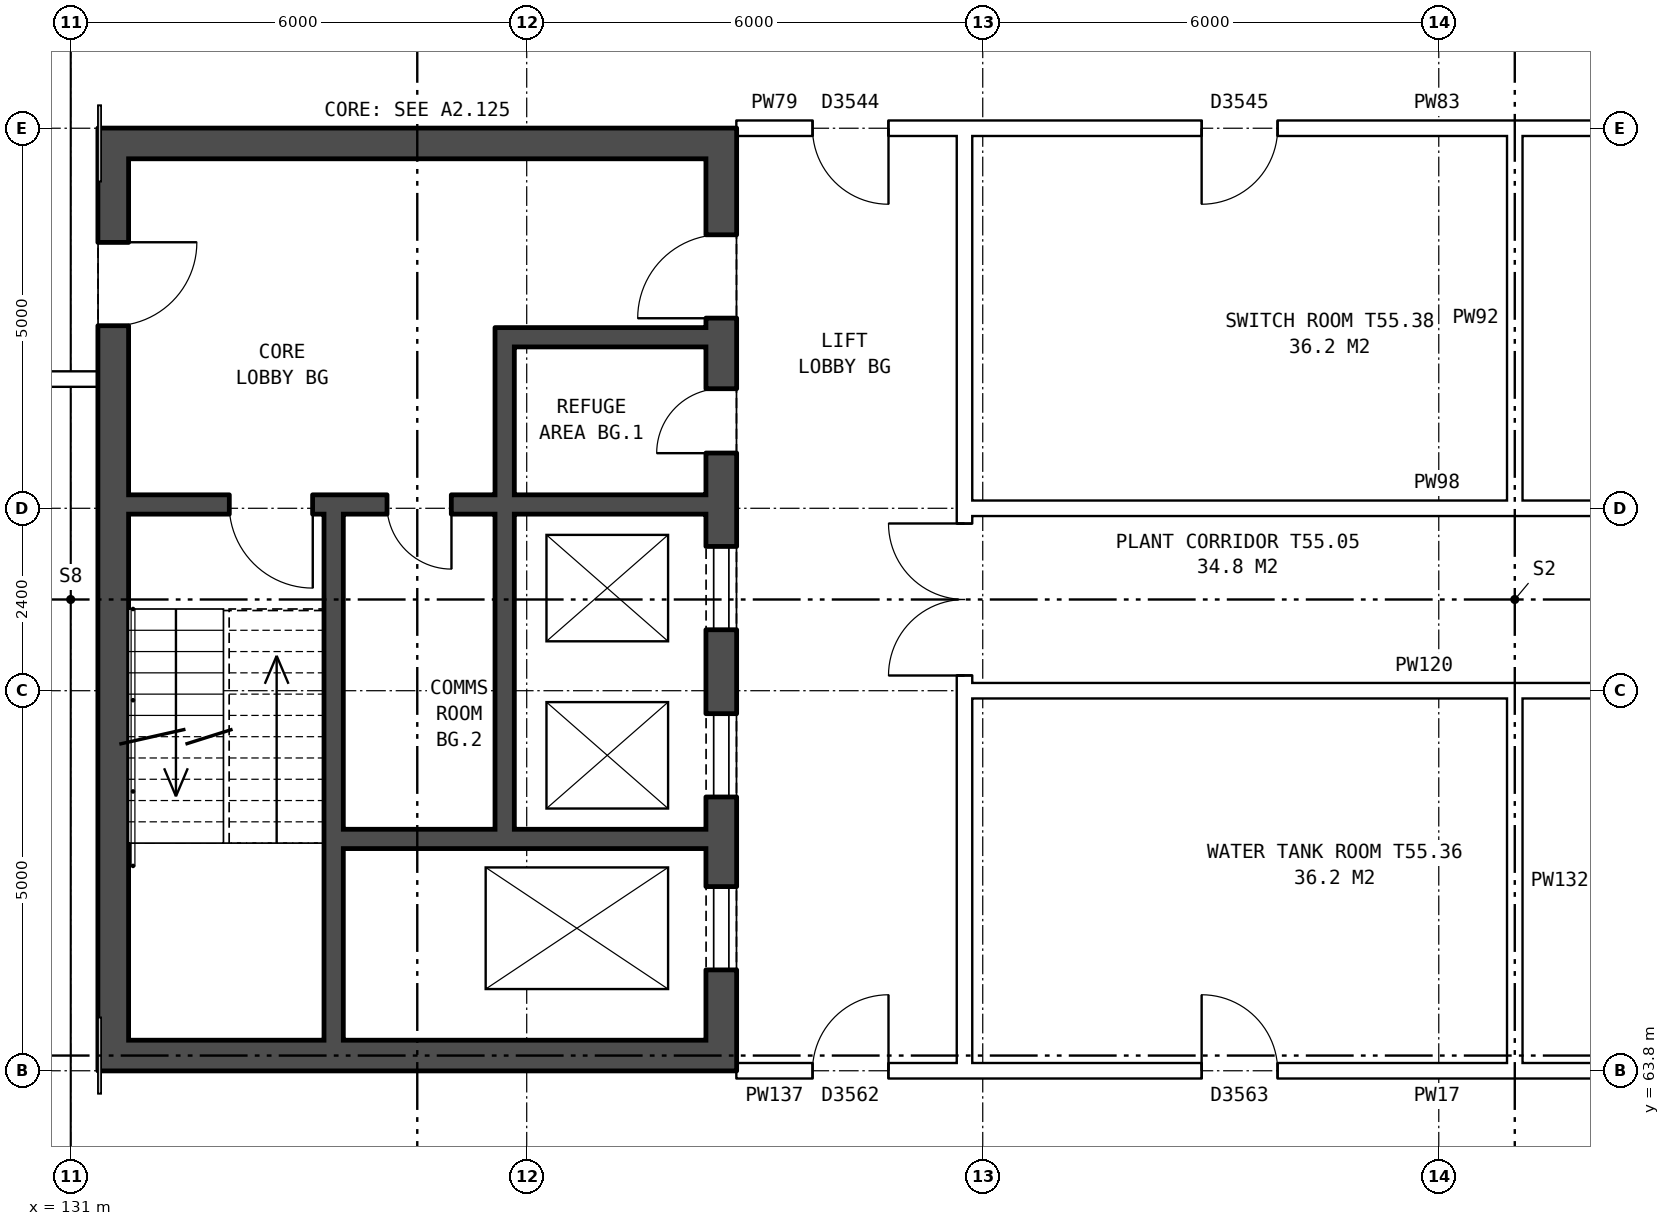
"""IFC4 building model, lengths in metres.
Left out: names, types, materials, properties, quantities, classifications, styles, units other than length and angle.
Written with IfcOpenShell. Run it as: python <this file> out.ifc"""

import sys

from ifc_helpers import new_model, si_unit, direction, frame, frame_2d, origin, place, context, subcontext, project, spatial, rectangle, extrude, element, fill, save


model = new_model("IFC4")
c1 = context("Model", 3, precision=1e-05, world=origin(), true_north=direction((0.0, 1.0)))
c2 = subcontext(c1, "Body", "Model", "MODEL_VIEW")
j1 = project(units=[si_unit("LENGTHUNIT", "METRE"), si_unit("PLANEANGLEUNIT", "RADIAN")], contexts=[c1])
p1 = place(None, origin())
s1 = spatial("IfcSite", under=j1, at=p1, CompositionType="ELEMENT")
p2 = place(p1, origin())
s2 = spatial("IfcBuilding", under=s1, at=p2, CompositionType="ELEMENT")
p3 = place(p2, frame((0.0, 0.0, 194.4)))
s3 = spatial("IfcBuildingStorey", under=s2, at=p3, CompositionType="ELEMENT", Elevation=194.4)
p4 = place(p3, frame((139.56, 63.8, 0.0), z_axis=(0.0, 0.0, 1.0), x_axis=(0.0, 1.0, 0.0)))
e1 = element("IfcWall", 1, at=p4, inside=s3, PredefinedType="SHEAR", context=c2, shape_type="SweptSolid", body=[
    extrude(rectangle(XDim=12.4, YDim=0.4, at=frame_2d((6.2, 0.0))), origin(), (0.0, 0.0, 1.0), 3.95),
])
p5 = place(p4, frame((1.325, 0.0, 0.0)))
e2 = element("IfcOpeningElement", 2, at=p5, cuts=e1, PredefinedType="OPENING", context=c2, shape_type="SweptSolid", body=[
    extrude(rectangle(XDim=1.1, YDim=2.1, at=frame_2d((0.55, 1.05))), frame((0.0, 0.21, 0.0), z_axis=(0.0, -1.0, 0.0), x_axis=(1.0, 0.0, 0.0)), (0.0, 0.0, 1.0), 0.42),
])
p6 = place(p4, frame((3.6, 0.0, 0.0)))
e3 = element("IfcOpeningElement", 3, at=p6, cuts=e1, PredefinedType="OPENING", context=c2, shape_type="SweptSolid", body=[
    extrude(rectangle(XDim=1.1, YDim=2.1, at=frame_2d((0.55, 1.05))), frame((0.0, 0.21, 0.0), z_axis=(0.0, -1.0, 0.0), x_axis=(1.0, 0.0, 0.0)), (0.0, 0.0, 1.0), 0.42),
])
p7 = place(p4, frame((5.8, 0.0, 0.0)))
e4 = element("IfcOpeningElement", 4, at=p7, cuts=e1, PredefinedType="OPENING", context=c2, shape_type="SweptSolid", body=[
    extrude(rectangle(XDim=1.1, YDim=2.1, at=frame_2d((0.55, 1.05))), frame((0.0, 0.21, 0.0), z_axis=(0.0, -1.0, 0.0), x_axis=(1.0, 0.0, 0.0)), (0.0, 0.0, 1.0), 0.42),
])
p8 = place(p4, frame((9.9, 0.0, 0.0)))
e5 = element("IfcOpeningElement", 5, at=p8, cuts=e1, PredefinedType="OPENING", context=c2, shape_type="SweptSolid", body=[
    extrude(rectangle(XDim=1.1, YDim=2.1, at=frame_2d((0.55, 1.05))), frame((0.0, 0.21, 0.0), z_axis=(0.0, -1.0, 0.0), x_axis=(1.0, 0.0, 0.0)), (0.0, 0.0, 1.0), 0.42),
])
p9 = place(p4, frame((8.125, 0.0, 0.0)))
e6 = element("IfcOpeningElement", 6, at=p9, cuts=e1, PredefinedType="OPENING", context=c2, shape_type="SweptSolid", body=[
    extrude(rectangle(XDim=0.85, YDim=2.1, at=frame_2d((0.425, 1.05))), frame((0.0, 0.21, 0.0), z_axis=(0.0, -1.0, 0.0), x_axis=(1.0, 0.0, 0.0)), (0.0, 0.0, 1.0), 0.42),
])
p10 = place(p3, frame((131.56, 63.8, 0.0), z_axis=(0.0, 0.0, 1.0), x_axis=(0.0, 1.0, 0.0)))
e7 = element("IfcWall", 7, at=p10, inside=s3, PredefinedType="SHEAR", context=c2, shape_type="SweptSolid", body=[
    extrude(rectangle(XDim=12.4, YDim=0.4, at=frame_2d((6.2, 0.0))), origin(), (0.0, 0.0, 1.0), 3.95),
])
p11 = place(p10, frame((9.8, 0.0, 0.0)))
e8 = element("IfcOpeningElement", 8, at=p11, cuts=e7, PredefinedType="OPENING", context=c2, shape_type="SweptSolid", body=[
    extrude(rectangle(XDim=1.1, YDim=2.1, at=frame_2d((0.55, 1.05))), frame((0.0, 0.21, 0.0), z_axis=(0.0, -1.0, 0.0), x_axis=(1.0, 0.0, 0.0)), (0.0, 0.0, 1.0), 0.42),
])
for number, where, z_axis, x_axis in (
    (9, (139.36, 64.0, 0.0), (0.0, 0.0, 1.0), (-1.0, 0.0, 0.0)),
    (10, (139.36, 76.0, 0.0), (0.0, 0.0, 1.0), (-1.0, 0.0, 0.0)),
):
    element("IfcWall", number, at=place(p3, frame(where, z_axis=z_axis, x_axis=x_axis)), inside=s3, PredefinedType="SHEAR", context=c2, shape_type="SweptSolid", body=[
        extrude(rectangle(XDim=7.6, YDim=0.4, at=frame_2d((3.8, 0.0))), origin(), (0.0, 0.0, 1.0), 3.95),
    ])
p12 = place(p3, frame((139.36, 66.85, 0.0), z_axis=(0.0, 0.0, 1.0), x_axis=(-1.0, 0.0, 0.0)))
e11 = element("IfcWall", 11, at=p12, inside=s3, PredefinedType="SHEAR", context=c2, shape_type="SweptSolid", body=[
    extrude(rectangle(XDim=4.775, YDim=0.25, at=frame_2d((2.388, 0.0))), origin(), (0.0, 0.0, 1.0), 3.95),
])
p13 = place(p3, frame((139.36, 71.25, 0.0), z_axis=(0.0, 0.0, 1.0), x_axis=(-1.0, 0.0, 0.0)))
e12 = element("IfcWall", 12, at=p13, inside=s3, PredefinedType="SHEAR", context=c2, shape_type="SweptSolid", body=[
    extrude(rectangle(XDim=7.6, YDim=0.25, at=frame_2d((3.8, 0.0))), origin(), (0.0, 0.0, 1.0), 3.95),
])
p14 = place(p13, frame((5.175, 0.0, 0.0)))
e13 = element("IfcOpeningElement", 13, at=p14, cuts=e12, PredefinedType="OPENING", context=c2, shape_type="SweptSolid", body=[
    extrude(rectangle(XDim=1.1, YDim=2.1, at=frame_2d((0.55, 1.05))), frame((0.0, 0.135, 0.0), z_axis=(0.0, -1.0, 0.0), x_axis=(1.0, 0.0, 0.0)), (0.0, 0.0, 1.0), 0.27),
])
p15 = place(p13, frame((3.35, 0.0, 0.0)))
e14 = element("IfcOpeningElement", 14, at=p15, cuts=e12, PredefinedType="OPENING", context=c2, shape_type="SweptSolid", body=[
    extrude(rectangle(XDim=0.85, YDim=2.1, at=frame_2d((0.425, 1.05))), frame((0.0, 0.135, 0.0), z_axis=(0.0, -1.0, 0.0), x_axis=(1.0, 0.0, 0.0)), (0.0, 0.0, 1.0), 0.27),
])
p16 = place(p3, frame((139.36, 73.45, 0.0), z_axis=(0.0, 0.0, 1.0), x_axis=(-1.0, 0.0, 0.0)))
e15 = element("IfcWall", 15, at=p16, inside=s3, PredefinedType="SHEAR", context=c2, shape_type="SweptSolid", body=[
    extrude(rectangle(XDim=2.525, YDim=0.25, at=frame_2d((1.263, 0.0))), origin(), (0.0, 0.0, 1.0), 3.95),
])
p17 = place(p3, frame((136.71, 66.975, 0.0), z_axis=(0.0, 0.0, 1.0), x_axis=(0.0, 1.0, 0.0)))
e16 = element("IfcWall", 16, at=p17, inside=s3, PredefinedType="SHEAR", context=c2, shape_type="SweptSolid", body=[
    extrude(rectangle(XDim=4.15, YDim=0.25, at=frame_2d((2.075, 0.0))), origin(), (0.0, 0.0, 1.0), 3.95),
])
p18 = place(p3, frame((136.71, 71.375, 0.0), z_axis=(0.0, 0.0, 1.0), x_axis=(0.0, 1.0, 0.0)))
e17 = element("IfcWall", 17, at=p18, inside=s3, PredefinedType="SHEAR", context=c2, shape_type="SweptSolid", body=[
    extrude(rectangle(XDim=2.2, YDim=0.25, at=frame_2d((1.1, 0.0))), origin(), (0.0, 0.0, 1.0), 3.95),
])
p19 = place(p3, frame((134.46, 64.2, 0.0), z_axis=(0.0, 0.0, 1.0), x_axis=(0.0, 1.0, 0.0)))
e18 = element("IfcWall", 18, at=p19, inside=s3, PredefinedType="SHEAR", context=c2, shape_type="SweptSolid", body=[
    extrude(rectangle(XDim=6.925, YDim=0.25, at=frame_2d((3.462, 0.0))), origin(), (0.0, 0.0, 1.0), 3.95),
])
p20 = place(p3, frame((142.76, 63.9, 0.0), z_axis=(0.0, 0.0, 1.0), x_axis=(0.0, 1.0, 0.0)))
e19 = element("IfcWall", 19, at=p20, inside=s3, PredefinedType="PARTITIONING", context=c2, shape_type="SweptSolid", body=[
    extrude(rectangle(XDim=12.2, YDim=0.2, at=frame_2d((6.1, 0.0))), origin(), (0.0, 0.0, 1.0), 3.95),
])
p21 = place(p20, frame((5.1, 0.0, 0.0)))
e20 = element("IfcOpeningElement", 20, at=p21, cuts=e19, PredefinedType="OPENING", context=c2, shape_type="SweptSolid", body=[
    extrude(rectangle(XDim=2.0, YDim=2.1, at=frame_2d((1.0, 1.05))), frame((0.0, 0.11, 0.0), z_axis=(0.0, -1.0, 0.0), x_axis=(1.0, 0.0, 0.0)), (0.0, 0.0, 1.0), 0.22),
])
p22 = place(p3, frame((142.76, 63.8, 0.0), z_axis=(0.0, 0.0, 1.0), x_axis=(1.0, 0.0, 0.0)))
e21 = element("IfcWall", 21, at=p22, inside=s3, PredefinedType="PARTITIONING", context=c2, shape_type="SweptSolid", body=[
    extrude(rectangle(XDim=14.48, YDim=0.2, at=frame_2d((7.24, 0.0))), origin(), (0.0, 0.0, 1.0), 3.95),
])
p23 = place(p22, frame((3.12, 0.0, 0.0)))
e22 = element("IfcOpeningElement", 22, at=p23, cuts=e21, PredefinedType="OPENING", context=c2, shape_type="SweptSolid", body=[
    extrude(rectangle(XDim=1.0, YDim=2.1, at=frame_2d((0.5, 1.05))), frame((0.0, 0.11, 0.0), z_axis=(0.0, -1.0, 0.0), x_axis=(1.0, 0.0, 0.0)), (0.0, 0.0, 1.0), 0.22),
])
p24 = place(p22, frame((10.36, 0.0, 0.0)))
e23 = element("IfcOpeningElement", 23, at=p24, cuts=e21, PredefinedType="OPENING", context=c2, shape_type="SweptSolid", body=[
    extrude(rectangle(XDim=1.0, YDim=2.1, at=frame_2d((0.5, 1.05))), frame((0.0, 0.11, 0.0), z_axis=(0.0, -1.0, 0.0), x_axis=(1.0, 0.0, 0.0)), (0.0, 0.0, 1.0), 0.22),
])
p25 = place(p3, frame((139.76, 63.8, 0.0), z_axis=(0.0, 0.0, 1.0), x_axis=(1.0, 0.0, 0.0)))
e24 = element("IfcWall", 24, at=p25, inside=s3, PredefinedType="PARTITIONING", context=c2, shape_type="SweptSolid", body=[
    extrude(rectangle(XDim=3.0, YDim=0.2, at=frame_2d((1.5, 0.0))), origin(), (0.0, 0.0, 1.0), 3.95),
])
p26 = place(p25, frame((1.0, 0.0, 0.0)))
e25 = element("IfcOpeningElement", 25, at=p26, cuts=e24, PredefinedType="OPENING", context=c2, shape_type="SweptSolid", body=[
    extrude(rectangle(XDim=1.0, YDim=2.1, at=frame_2d((0.5, 1.05))), frame((0.0, 0.11, 0.0), z_axis=(0.0, -1.0, 0.0), x_axis=(1.0, 0.0, 0.0)), (0.0, 0.0, 1.0), 0.22),
])
for number, where, z_axis, x_axis in (
    (26, (142.76, 68.8, 0.0), (0.0, 0.0, 1.0), (1.0, 0.0, 0.0)),
    (27, (142.76, 71.2, 0.0), (0.0, 0.0, 1.0), (1.0, 0.0, 0.0)),
):
    element("IfcWall", number, at=place(p3, frame(where, z_axis=z_axis, x_axis=x_axis)), inside=s3, PredefinedType="PARTITIONING", context=c2, shape_type="SweptSolid", body=[
        extrude(rectangle(XDim=14.48, YDim=0.2, at=frame_2d((7.24, 0.0))), origin(), (0.0, 0.0, 1.0), 3.95),
    ])
p27 = place(p3, frame((75.64, 72.9, 0.0), z_axis=(0.0, 0.0, 1.0), x_axis=(1.0, 0.0, 0.0)))
e28 = element("IfcWall", 28, at=p27, inside=s3, PredefinedType="PARTITIONING", context=c2, shape_type="SweptSolid", body=[
    extrude(rectangle(XDim=55.72, YDim=0.2, at=frame_2d((27.86, 0.0))), origin(), (0.0, 0.0, 1.0), 3.95),
])
p28 = place(p27, frame((6.555, 0.0, 0.0)))
e29 = element("IfcOpeningElement", 29, at=p28, cuts=e28, PredefinedType="OPENING", context=c2, shape_type="SweptSolid", body=[
    extrude(rectangle(XDim=1.0, YDim=2.1, at=frame_2d((0.5, 1.05))), frame((0.0, 0.11, 0.0), z_axis=(0.0, -1.0, 0.0), x_axis=(1.0, 0.0, 0.0)), (0.0, 0.0, 1.0), 0.22),
])
p29 = place(p27, frame((20.485, 0.0, 0.0)))
e30 = element("IfcOpeningElement", 30, at=p29, cuts=e28, PredefinedType="OPENING", context=c2, shape_type="SweptSolid", body=[
    extrude(rectangle(XDim=1.0, YDim=2.1, at=frame_2d((0.5, 1.05))), frame((0.0, 0.11, 0.0), z_axis=(0.0, -1.0, 0.0), x_axis=(1.0, 0.0, 0.0)), (0.0, 0.0, 1.0), 0.22),
])
p30 = place(p27, frame((34.235, 0.0, 0.0)))
e31 = element("IfcOpeningElement", 31, at=p30, cuts=e28, PredefinedType="OPENING", context=c2, shape_type="SweptSolid", body=[
    extrude(rectangle(XDim=1.0, YDim=2.1, at=frame_2d((0.5, 1.05))), frame((0.0, 0.11, 0.0), z_axis=(0.0, -1.0, 0.0), x_axis=(1.0, 0.0, 0.0)), (0.0, 0.0, 1.0), 0.22),
])
p31 = place(p27, frame((48.165, 0.0, 0.0)))
e32 = element("IfcOpeningElement", 32, at=p31, cuts=e28, PredefinedType="OPENING", context=c2, shape_type="SweptSolid", body=[
    extrude(rectangle(XDim=1.0, YDim=2.1, at=frame_2d((0.5, 1.05))), frame((0.0, 0.11, 0.0), z_axis=(0.0, -1.0, 0.0), x_axis=(1.0, 0.0, 0.0)), (0.0, 0.0, 1.0), 0.22),
])
p32 = place(p3, frame((142.76, 76.2, 0.0), z_axis=(0.0, 0.0, 1.0), x_axis=(1.0, 0.0, 0.0)))
e33 = element("IfcWall", 33, at=p32, inside=s3, PredefinedType="PARTITIONING", context=c2, shape_type="SweptSolid", body=[
    extrude(rectangle(XDim=14.48, YDim=0.2, at=frame_2d((7.24, 0.0))), origin(), (0.0, 0.0, 1.0), 3.95),
])
p33 = place(p32, frame((3.12, 0.0, 0.0)))
e34 = element("IfcOpeningElement", 34, at=p33, cuts=e33, PredefinedType="OPENING", context=c2, shape_type="SweptSolid", body=[
    extrude(rectangle(XDim=1.0, YDim=2.1, at=frame_2d((0.5, 1.05))), frame((0.0, 0.11, 0.0), z_axis=(0.0, -1.0, 0.0), x_axis=(1.0, 0.0, 0.0)), (0.0, 0.0, 1.0), 0.22),
])
p34 = place(p32, frame((10.36, 0.0, 0.0)))
e35 = element("IfcOpeningElement", 35, at=p34, cuts=e33, PredefinedType="OPENING", context=c2, shape_type="SweptSolid", body=[
    extrude(rectangle(XDim=1.0, YDim=2.1, at=frame_2d((0.5, 1.05))), frame((0.0, 0.11, 0.0), z_axis=(0.0, -1.0, 0.0), x_axis=(1.0, 0.0, 0.0)), (0.0, 0.0, 1.0), 0.22),
])
p35 = place(p3, frame((139.76, 76.2, 0.0), z_axis=(0.0, 0.0, 1.0), x_axis=(1.0, 0.0, 0.0)))
e36 = element("IfcWall", 36, at=p35, inside=s3, PredefinedType="PARTITIONING", context=c2, shape_type="SweptSolid", body=[
    extrude(rectangle(XDim=3.0, YDim=0.2, at=frame_2d((1.5, 0.0))), origin(), (0.0, 0.0, 1.0), 3.95),
])
p36 = place(p35, frame((1.0, 0.0, 0.0)))
e37 = element("IfcOpeningElement", 37, at=p36, cuts=e36, PredefinedType="OPENING", context=c2, shape_type="SweptSolid", body=[
    extrude(rectangle(XDim=1.0, YDim=2.1, at=frame_2d((0.5, 1.05))), frame((0.0, 0.11, 0.0), z_axis=(0.0, -1.0, 0.0), x_axis=(1.0, 0.0, 0.0)), (0.0, 0.0, 1.0), 0.22),
])
for number, where, z_axis, x_axis in (
    (38, (150.0, 63.7, 0.0), (0.0, 0.0, 1.0), (0.0, 1.0, 0.0)),
    (39, (150.0, 71.1, 0.0), (0.0, 0.0, 1.0), (0.0, 1.0, 0.0)),
):
    element("IfcWall", number, at=place(p3, frame(where, z_axis=z_axis, x_axis=x_axis)), inside=s3, PredefinedType="PARTITIONING", context=c2, shape_type="SweptSolid", body=[
        extrude(rectangle(XDim=5.2, YDim=0.2, at=frame_2d((2.6, 0.0))), origin(), (0.0, 0.0, 1.0), 3.95),
    ])
p37 = place(p5, origin())
e40 = element("IfcDoor", 40, at=p37, inside=s3, OperationType="DOUBLE_DOOR_SLIDING", PredefinedType="DOOR", context=c2, shape_type="SweptSolid", body=[
    extrude(rectangle(XDim=1.1, YDim=2.1, at=frame_2d((0.55, 1.05))), frame((0.0, 0.185, 0.0), z_axis=(0.0, -1.0, 0.0), x_axis=(1.0, 0.0, 0.0)), (0.0, 0.0, 1.0), 0.05),
])
fill(e2, e40)
p38 = place(p6, origin())
e41 = element("IfcDoor", 41, at=p38, inside=s3, OperationType="DOUBLE_DOOR_SLIDING", PredefinedType="DOOR", context=c2, shape_type="SweptSolid", body=[
    extrude(rectangle(XDim=1.1, YDim=2.1, at=frame_2d((0.55, 1.05))), frame((0.0, 0.185, 0.0), z_axis=(0.0, -1.0, 0.0), x_axis=(1.0, 0.0, 0.0)), (0.0, 0.0, 1.0), 0.05),
])
fill(e3, e41)
p39 = place(p7, origin())
e42 = element("IfcDoor", 42, at=p39, inside=s3, OperationType="DOUBLE_DOOR_SLIDING", PredefinedType="DOOR", context=c2, shape_type="SweptSolid", body=[
    extrude(rectangle(XDim=1.1, YDim=2.1, at=frame_2d((0.55, 1.05))), frame((0.0, 0.185, 0.0), z_axis=(0.0, -1.0, 0.0), x_axis=(1.0, 0.0, 0.0)), (0.0, 0.0, 1.0), 0.05),
])
fill(e4, e42)
p40 = place(p8, origin())
e43 = element("IfcDoor", 43, at=p40, inside=s3, OperationType="SINGLE_SWING_LEFT", PredefinedType="DOOR", context=c2, shape_type="SweptSolid", body=[
    extrude(rectangle(XDim=1.1, YDim=2.1, at=frame_2d((0.55, 1.05))), frame((0.0, 0.185, 0.0), z_axis=(0.0, -1.0, 0.0), x_axis=(1.0, 0.0, 0.0)), (0.0, 0.0, 1.0), 0.05),
])
fill(e5, e43)
p41 = place(p14, origin())
e44 = element("IfcDoor", 44, at=p41, inside=s3, OperationType="SINGLE_SWING_LEFT", PredefinedType="DOOR", context=c2, shape_type="SweptSolid", body=[
    extrude(rectangle(XDim=1.1, YDim=2.1, at=frame_2d((0.55, 1.05))), frame((0.0, 0.025, 0.0), z_axis=(0.0, -1.0, 0.0), x_axis=(1.0, 0.0, 0.0)), (0.0, 0.0, 1.0), 0.05),
])
fill(e13, e44)
p42 = place(p9, origin())
e45 = element("IfcDoor", 45, at=p42, inside=s3, OperationType="SINGLE_SWING_LEFT", PredefinedType="DOOR", context=c2, shape_type="SweptSolid", body=[
    extrude(rectangle(XDim=0.85, YDim=2.1, at=frame_2d((0.425, 1.05))), frame((0.0, 0.185, 0.0), z_axis=(0.0, -1.0, 0.0), x_axis=(1.0, 0.0, 0.0)), (0.0, 0.0, 1.0), 0.05),
])
fill(e6, e45)
p43 = place(p15, origin())
e46 = element("IfcDoor", 46, at=p43, inside=s3, OperationType="SINGLE_SWING_LEFT", PredefinedType="DOOR", context=c2, shape_type="SweptSolid", body=[
    extrude(rectangle(XDim=0.85, YDim=2.1, at=frame_2d((0.425, 1.05))), frame((0.0, 0.025, 0.0), z_axis=(0.0, -1.0, 0.0), x_axis=(1.0, 0.0, 0.0)), (0.0, 0.0, 1.0), 0.05),
])
fill(e14, e46)
p44 = place(p11, frame((1.1, 0.0, 0.0), z_axis=(0.0, 0.0, 1.0), x_axis=(-1.0, 0.0, 0.0)))
e47 = element("IfcDoor", 47, at=p44, inside=s3, OperationType="SINGLE_SWING_LEFT", PredefinedType="DOOR", context=c2, shape_type="SweptSolid", body=[
    extrude(rectangle(XDim=1.1, YDim=2.1, at=frame_2d((0.55, 1.05))), frame((0.0, 0.185, 0.0), z_axis=(0.0, -1.0, 0.0), x_axis=(1.0, 0.0, 0.0)), (0.0, 0.0, 1.0), 0.05),
])
fill(e8, e47)
p45 = place(p21, origin())
e48 = element("IfcDoor", 48, at=p45, inside=s3, OperationType="DOUBLE_DOOR_SINGLE_SWING", PredefinedType="DOOR", context=c2, shape_type="SweptSolid", body=[
    extrude(rectangle(XDim=2.0, YDim=2.1, at=frame_2d((1.0, 1.05))), frame((0.0, 0.025, 0.0), z_axis=(0.0, -1.0, 0.0), x_axis=(1.0, 0.0, 0.0)), (0.0, 0.0, 1.0), 0.05),
])
fill(e20, e48)
p46 = place(p23, origin())
e49 = element("IfcDoor", 49, at=p46, inside=s3, OperationType="SINGLE_SWING_LEFT", PredefinedType="DOOR", context=c2, shape_type="SweptSolid", body=[
    extrude(rectangle(XDim=1.0, YDim=2.1, at=frame_2d((0.5, 1.05))), frame((0.0, 0.025, 0.0), z_axis=(0.0, -1.0, 0.0), x_axis=(1.0, 0.0, 0.0)), (0.0, 0.0, 1.0), 0.05),
])
fill(e22, e49)
p47 = place(p26, origin())
e50 = element("IfcDoor", 50, at=p47, inside=s3, OperationType="SINGLE_SWING_RIGHT", PredefinedType="DOOR", context=c2, shape_type="SweptSolid", body=[
    extrude(rectangle(XDim=1.0, YDim=2.1, at=frame_2d((0.5, 1.05))), frame((0.0, 0.025, 0.0), z_axis=(0.0, -1.0, 0.0), x_axis=(1.0, 0.0, 0.0)), (0.0, 0.0, 1.0), 0.05),
])
fill(e25, e50)
p48 = place(p33, frame((1.0, 0.0, 0.0), z_axis=(0.0, 0.0, 1.0), x_axis=(-1.0, 0.0, 0.0)))
e51 = element("IfcDoor", 51, at=p48, inside=s3, OperationType="SINGLE_SWING_RIGHT", PredefinedType="DOOR", context=c2, shape_type="SweptSolid", body=[
    extrude(rectangle(XDim=1.0, YDim=2.1, at=frame_2d((0.5, 1.05))), frame((0.0, 0.025, 0.0), z_axis=(0.0, -1.0, 0.0), x_axis=(1.0, 0.0, 0.0)), (0.0, 0.0, 1.0), 0.05),
])
fill(e34, e51)
p49 = place(p36, frame((1.0, 0.0, 0.0), z_axis=(0.0, 0.0, 1.0), x_axis=(-1.0, 0.0, 0.0)))
e52 = element("IfcDoor", 52, at=p49, inside=s3, OperationType="SINGLE_SWING_LEFT", PredefinedType="DOOR", context=c2, shape_type="SweptSolid", body=[
    extrude(rectangle(XDim=1.0, YDim=2.1, at=frame_2d((0.5, 1.05))), frame((0.0, 0.025, 0.0), z_axis=(0.0, -1.0, 0.0), x_axis=(1.0, 0.0, 0.0)), (0.0, 0.0, 1.0), 0.05),
])
fill(e37, e52)
save(model, sys.argv[1])
